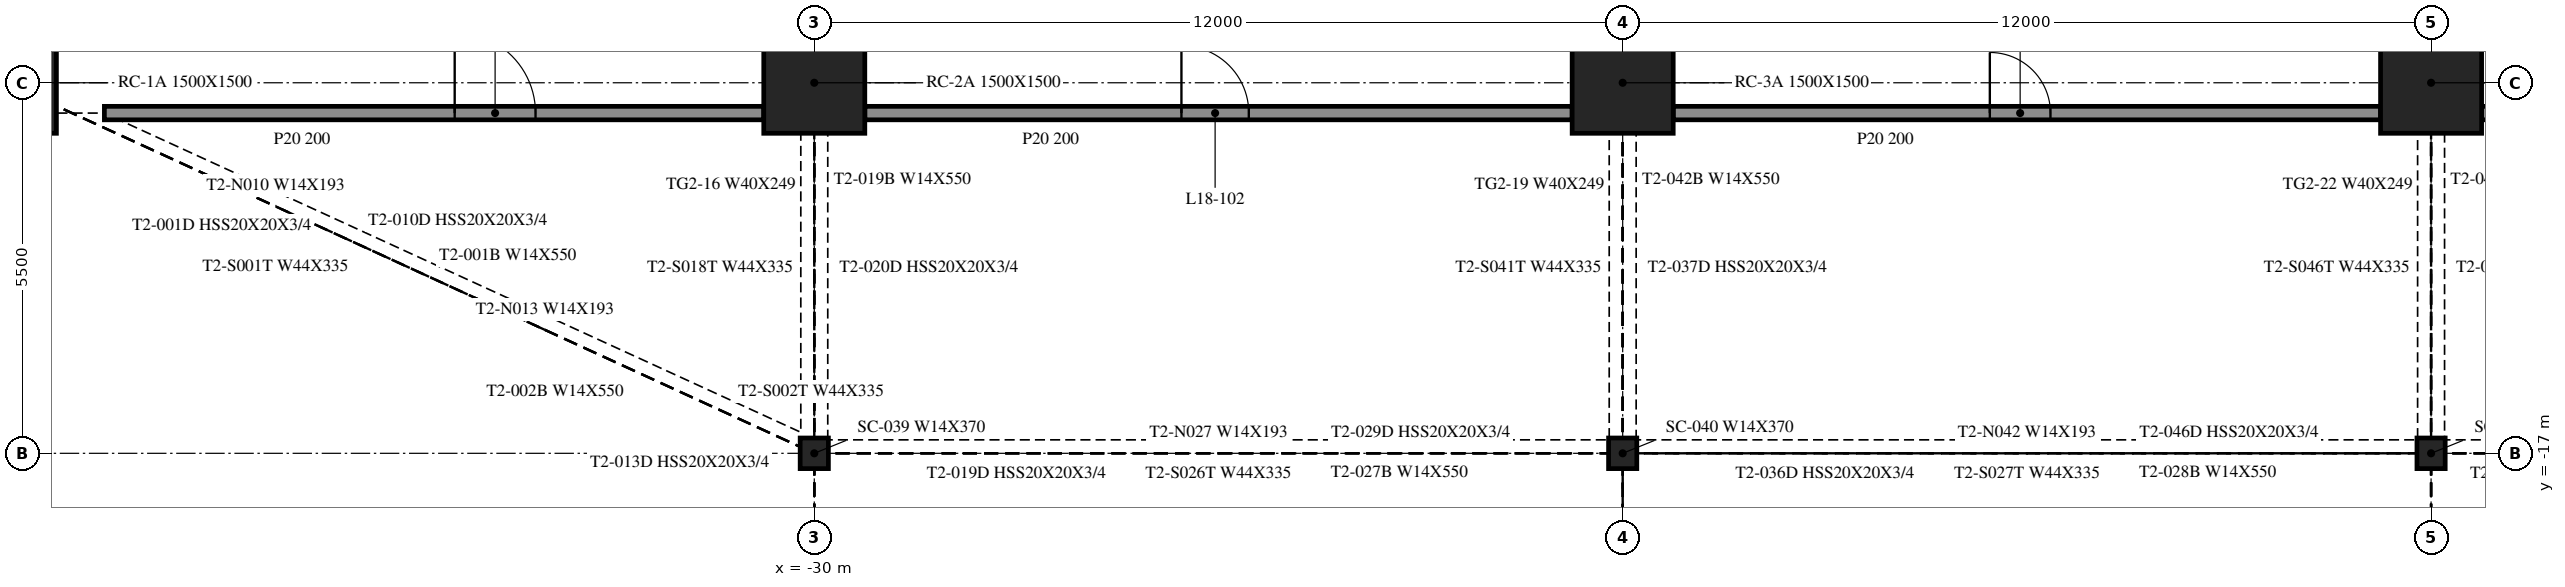
"""IFC4 building model, lengths in metres.
Left out: names, types, materials, properties, quantities, classifications, styles, units other than length and angle.
Written with IfcOpenShell. Run it as: python <this file> out.ifc"""

import sys

from ifc_helpers import new_model, si_unit, direction, frame, frame_2d, origin, origin_2d, place, context, subcontext, project, spatial, rectangle, i_section, extrude, element, fill, save


model = new_model("IFC4")
c1 = context("Model", 3, precision=1e-05, world=origin(), true_north=direction((0.0, 1.0)))
c2 = subcontext(c1, "Body", "Model", "MODEL_VIEW")
j1 = project(units=[si_unit("LENGTHUNIT", "METRE"), si_unit("PLANEANGLEUNIT", "RADIAN")], contexts=[c1])
p1 = place(None, origin())
s1 = spatial("IfcSite", under=j1, at=p1, CompositionType="ELEMENT")
p2 = place(p1, origin())
s2 = spatial("IfcBuilding", under=s1, at=p2, CompositionType="ELEMENT")
p3 = place(p2, frame((0.0, 0.0, 80.4)))
s3 = spatial("IfcBuildingStorey", under=s2, at=p3, CompositionType="ELEMENT", Elevation=80.4)
for number, where, z_axis, x_axis in (
    (1, (-42.0, -11.5, -0.55), (0.0, 0.0, 1.0), (1.0, 0.0, 0.0)),
    (2, (-30.0, -11.5, -0.55), (0.0, 0.0, 1.0), (1.0, 0.0, 0.0)),
    (3, (-18.0, -11.5, -0.55), (0.0, 0.0, 1.0), (1.0, 0.0, 0.0)),
    (4, (-6.0, -11.5, -0.55), (0.0, 0.0, 1.0), (1.0, 0.0, 0.0)),
):
    element("IfcColumn", number, at=place(p3, frame(where, z_axis=z_axis, x_axis=x_axis)), inside=s3, PredefinedType="COLUMN", context=c2, shape_type="SweptSolid", body=[
        extrude(rectangle(XDim=1.5, YDim=1.5, at=origin_2d()), origin(), (0.0, 0.0, 1.0), 4.61),
    ])
for number, where, z_axis, x_axis in (
    (5, (-30.0, -17.0, -0.55), (0.0, 0.0, 1.0), (1.0, 0.0, 0.0)),
    (6, (-18.0, -17.0, -0.55), (0.0, 0.0, 1.0), (1.0, 0.0, 0.0)),
    (7, (-6.0, -17.0, -0.55), (0.0, 0.0, 1.0), (1.0, 0.0, 0.0)),
):
    element("IfcColumn", number, at=place(p3, frame(where, z_axis=z_axis, x_axis=x_axis)), inside=s3, PredefinedType="COLUMN", context=c2, shape_type="SweptSolid", body=[
        extrude(i_section(OverallWidth=0.419, OverallDepth=0.455, WebThickness=0.042, FlangeThickness=0.068, at=origin_2d()), origin(), (0.0, 0.0, 1.0), 4.61),
    ])
p4 = place(p3, frame((-40.538, -11.95, 0.0), z_axis=(0.0, 0.0, 1.0), x_axis=(1.0, 0.0, 0.0)))
e8 = element("IfcWall", 8, at=p4, inside=s3, PredefinedType="PARTITIONING", context=c2, shape_type="SweptSolid", body=[
    extrude(rectangle(XDim=9.788, YDim=0.2, at=frame_2d((4.894, 0.0))), origin(), (0.0, 0.0, 1.0), 4.06),
])
p5 = place(p4, frame((5.2, 0.0, 0.0)))
e9 = element("IfcOpeningElement", 9, at=p5, cuts=e8, PredefinedType="OPENING", context=c2, shape_type="SweptSolid", body=[
    extrude(rectangle(XDim=1.2, YDim=2.1, at=frame_2d((0.6, 1.05))), frame((0.0, 0.11, 0.0), z_axis=(0.0, -1.0, 0.0), x_axis=(1.0, 0.0, 0.0)), (0.0, 0.0, 1.0), 0.22),
])
p6 = place(p3, frame((-29.25, -11.95, 0.0), z_axis=(0.0, 0.0, 1.0), x_axis=(1.0, 0.0, 0.0)))
e10 = element("IfcWall", 10, at=p6, inside=s3, PredefinedType="PARTITIONING", context=c2, shape_type="SweptSolid", body=[
    extrude(rectangle(XDim=10.5, YDim=0.2, at=frame_2d((5.25, 0.0))), origin(), (0.0, 0.0, 1.0), 4.06),
])
p7 = place(p6, frame((4.7, 0.0, 0.0)))
e11 = element("IfcOpeningElement", 11, at=p7, cuts=e10, PredefinedType="OPENING", context=c2, shape_type="SweptSolid", body=[
    extrude(rectangle(XDim=1.0, YDim=2.1, at=frame_2d((0.5, 1.05))), frame((0.0, 0.11, 0.0), z_axis=(0.0, -1.0, 0.0), x_axis=(1.0, 0.0, 0.0)), (0.0, 0.0, 1.0), 0.22),
])
p8 = place(p3, frame((-17.25, -11.95, 0.0), z_axis=(0.0, 0.0, 1.0), x_axis=(1.0, 0.0, 0.0)))
e12 = element("IfcWall", 12, at=p8, inside=s3, PredefinedType="PARTITIONING", context=c2, shape_type="SweptSolid", body=[
    extrude(rectangle(XDim=10.5, YDim=0.2, at=frame_2d((5.25, 0.0))), origin(), (0.0, 0.0, 1.0), 4.06),
])
p9 = place(p8, frame((4.7, 0.0, 0.0)))
e13 = element("IfcOpeningElement", 13, at=p9, cuts=e12, PredefinedType="OPENING", context=c2, shape_type="SweptSolid", body=[
    extrude(rectangle(XDim=0.9, YDim=2.1, at=frame_2d((0.45, 1.05))), frame((0.0, 0.11, 0.0), z_axis=(0.0, -1.0, 0.0), x_axis=(1.0, 0.0, 0.0)), (0.0, 0.0, 1.0), 0.22),
])
p10 = place(p3, frame((-5.25, -11.95, 0.0), z_axis=(0.0, 0.0, 1.0), x_axis=(1.0, 0.0, 0.0)))
e14 = element("IfcWall", 14, at=p10, inside=s3, PredefinedType="PARTITIONING", context=c2, shape_type="SweptSolid", body=[
    extrude(rectangle(XDim=10.5, YDim=0.2, at=frame_2d((5.25, 0.0))), origin(), (0.0, 0.0, 1.0), 4.06),
])
p11 = place(p10, frame((4.7, 0.0, 0.0)))
e15 = element("IfcOpeningElement", 15, at=p11, cuts=e14, PredefinedType="OPENING", context=c2, shape_type="SweptSolid", body=[
    extrude(rectangle(XDim=1.0, YDim=2.1, at=frame_2d((0.5, 1.05))), frame((0.0, 0.11, 0.0), z_axis=(0.0, -1.0, 0.0), x_axis=(1.0, 0.0, 0.0)), (0.0, 0.0, 1.0), 0.22),
])
p12 = place(p5, origin())
e16 = element("IfcDoor", 16, at=p12, inside=s3, OperationType="SINGLE_SWING_LEFT", PredefinedType="DOOR", context=c2, shape_type="SweptSolid", body=[
    extrude(rectangle(XDim=1.2, YDim=2.1, at=frame_2d((0.6, 1.05))), frame((0.0, 0.025, 0.0), z_axis=(0.0, -1.0, 0.0), x_axis=(1.0, 0.0, 0.0)), (0.0, 0.0, 1.0), 0.05),
])
fill(e9, e16)
p13 = place(p7, origin())
e17 = element("IfcDoor", 17, at=p13, inside=s3, OperationType="SINGLE_SWING_RIGHT", PredefinedType="DOOR", context=c2, shape_type="SweptSolid", body=[
    extrude(rectangle(XDim=1.0, YDim=2.1, at=frame_2d((0.5, 1.05))), frame((0.0, 0.025, 0.0), z_axis=(0.0, -1.0, 0.0), x_axis=(1.0, 0.0, 0.0)), (0.0, 0.0, 1.0), 0.05),
])
fill(e11, e17)
p14 = place(p9, origin())
e18 = element("IfcDoor", 18, at=p14, inside=s3, OperationType="SINGLE_SWING_RIGHT", PredefinedType="DOOR", context=c2, shape_type="SweptSolid", body=[
    extrude(rectangle(XDim=0.9, YDim=2.1, at=frame_2d((0.45, 1.05))), frame((0.0, 0.025, 0.0), z_axis=(0.0, -1.0, 0.0), x_axis=(1.0, 0.0, 0.0)), (0.0, 0.0, 1.0), 0.05),
])
fill(e13, e18)
save(model, sys.argv[1])
